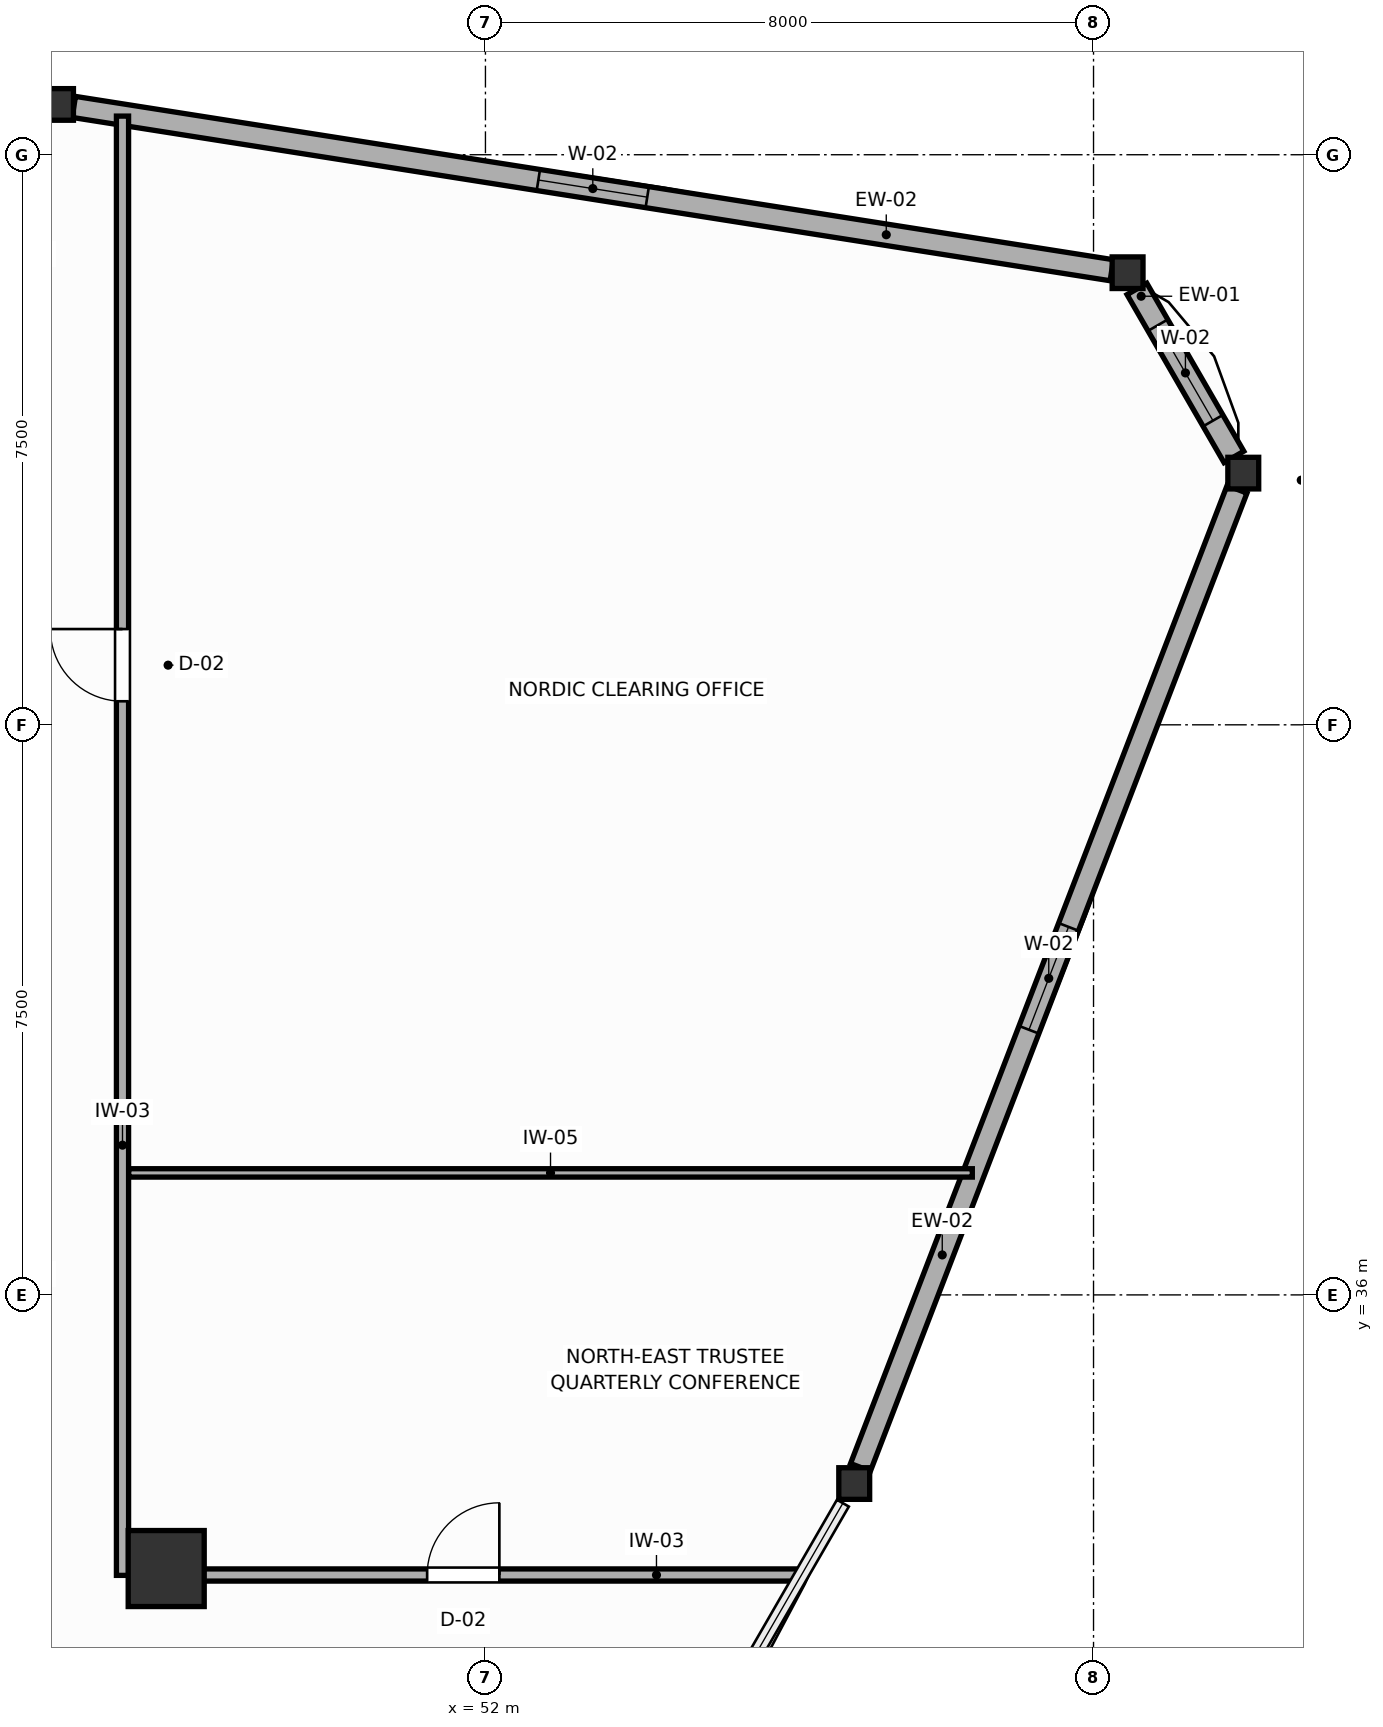
"""IFC4 building model, lengths in metres.
Left out: names, types, materials, properties, quantities, classifications, styles, units other than length and angle.
Written with IfcOpenShell. Run it as: python <this file> out.ifc"""

import sys

from ifc_helpers import new_model, si_unit, direction, frame, frame_2d, origin, origin_2d, place, context, subcontext, project, spatial, rectangle, i_section, extrude, source, transform, mapped, element, fill, save


model = new_model("IFC4")
c1 = context("Model", 3, precision=1e-05, world=origin(), true_north=direction((0.0, 1.0)))
c2 = subcontext(c1, "Body", "Model", "MODEL_VIEW")
j1 = project(units=[si_unit("LENGTHUNIT", "METRE"), si_unit("PLANEANGLEUNIT", "RADIAN")], contexts=[c1])
p1 = place(None, origin())
s1 = spatial("IfcSite", under=j1, at=p1, CompositionType="ELEMENT")
p2 = place(p1, origin())
s2 = spatial("IfcBuilding", under=s1, at=p2, CompositionType="ELEMENT")
p3 = place(p2, frame((0.0, 0.0, 205.8)))
s3 = spatial("IfcBuildingStorey", under=s2, at=p3, CompositionType="ELEMENT", Elevation=205.8)
m1 = source(origin(), c2, "Body", "SweptSolid", [
    extrude(rectangle(XDim=1.0, YDim=1.0, at=origin_2d()), origin(), (0.0, 0.0, 1.0), 3.6),
])
p4 = place(p3, frame((47.8, 32.4, 0.0), z_axis=(0.0, 0.0, 1.0), x_axis=(1.0, 0.0, 0.0)))
e1 = element("IfcColumn", 1, at=p4, inside=s3, PredefinedType="COLUMN", context=c2, shape_type="MappedRepresentation", body=[
    mapped(m1, transform((0.0, 0.0, 0.0), scale=1.0)),
])
m2 = source(origin(), c2, "Body", "SweptSolid", [
    extrude(i_section(OverallWidth=0.406, OverallDepth=0.416, WebThickness=0.027, FlangeThickness=0.044, FilletRadius=0.015, at=origin_2d()), origin(), (0.0, 0.0, 1.0), 3.6),
])
for number, where, z_axis, x_axis in (
    (2, (61.97, 46.811, 0.0), (0.0, 0.0, 1.0), (1.0, 0.0, 0.0)),
    (3, (60.448, 49.448, 0.0), (0.0, 0.0, 1.0), (1.0, 0.0, 0.0)),
    (4, (46.377, 51.662, 0.0), (0.0, 0.0, 1.0), (1.0, 0.0, 0.0)),
    (5, (56.852, 33.518, 0.0), (0.0, 0.0, 1.0), (1.0, 0.0, 0.0)),
):
    element("IfcColumn", number, at=place(p3, frame(where, z_axis=z_axis, x_axis=x_axis)), inside=s3, PredefinedType="COLUMN", context=c2, shape_type="MappedRepresentation", body=[
        mapped(m2, transform((0.0, 0.0, 0.0), scale=1.0)),
    ])
p5 = place(p3, frame((61.847, 47.024, 0.0), z_axis=(0.0, 0.0, 1.0), x_axis=(-0.49997637333, 0.866039044219, 0.0)))
e6 = element("IfcWall", 6, at=p5, inside=s3, PredefinedType="SOLIDWALL", context=c2, shape_type="SweptSolid", body=[
    extrude(rectangle(XDim=2.552, YDim=0.3, at=frame_2d((1.276, 0.0))), origin(), (0.0, 0.0, 1.0), 3.02),
])
p6 = place(p5, frame((0.551, 0.0, 0.75)))
e7 = element("IfcOpeningElement", 7, at=p6, cuts=e6, PredefinedType="OPENING", context=c2, shape_type="SweptSolid", body=[
    extrude(rectangle(XDim=1.45, YDim=1.65, at=frame_2d((0.725, 0.825))), frame((0.0, 0.16, 0.0), z_axis=(0.0, -1.0, 0.0), x_axis=(1.0, 0.0, 0.0)), (0.0, 0.0, 1.0), 0.32),
])
p7 = place(p3, frame((60.24, 49.48, 0.0), z_axis=(0.0, 0.0, 1.0), x_axis=(-0.987848165878, 0.155422009936, 0.0)))
e8 = element("IfcWall", 8, at=p7, inside=s3, PredefinedType="SOLIDWALL", context=c2, shape_type="SweptSolid", body=[
    extrude(rectangle(XDim=13.823, YDim=0.28, at=frame_2d((6.912, 0.0))), origin(), (0.0, 0.0, 1.0), 3.02),
])
p8 = place(p7, frame((6.187, 0.0, 0.75)))
e9 = element("IfcOpeningElement", 9, at=p8, cuts=e8, PredefinedType="OPENING", context=c2, shape_type="SweptSolid", body=[
    extrude(rectangle(XDim=1.45, YDim=1.65, at=frame_2d((0.725, 0.825))), frame((0.0, 0.15, 0.0), z_axis=(0.0, -1.0, 0.0), x_axis=(1.0, 0.0, 0.0)), (0.0, 0.0, 1.0), 0.3),
])
p9 = place(p3, frame((56.934, 33.731, 0.0), z_axis=(0.0, 0.0, 1.0), x_axis=(0.359321962573, 0.933213655715, 0.0)))
e10 = element("IfcWall", 10, at=p9, inside=s3, PredefinedType="SOLIDWALL", context=c2, shape_type="SweptSolid", body=[
    extrude(rectangle(XDim=13.788, YDim=0.28, at=frame_2d((6.894, 0.0))), origin(), (0.0, 0.0, 1.0), 3.02),
])
p10 = place(p9, frame((6.169, 0.0, 0.75)))
e11 = element("IfcOpeningElement", 11, at=p10, cuts=e10, PredefinedType="OPENING", context=c2, shape_type="SweptSolid", body=[
    extrude(rectangle(XDim=1.45, YDim=1.65, at=frame_2d((0.725, 0.825))), frame((0.0, 0.15, 0.0), z_axis=(0.0, -1.0, 0.0), x_axis=(1.0, 0.0, 0.0)), (0.0, 0.0, 1.0), 0.3),
])
p11 = place(p3, frame((47.225, 32.31, 0.0), z_axis=(0.0, 0.0, 1.0), x_axis=(0.0, 1.0, 0.0)))
e12 = element("IfcWall", 12, at=p11, inside=s3, PredefinedType="PARTITIONING", context=c2, shape_type="SweptSolid", body=[
    extrude(rectangle(XDim=19.198, YDim=0.16, at=frame_2d((9.599, 0.0))), origin(), (0.0, 0.0, 1.0), 3.41),
])
p12 = place(p11, frame((11.5, 0.0, 0.0)))
e13 = element("IfcOpeningElement", 13, at=p12, cuts=e12, PredefinedType="OPENING", context=c2, shape_type="SweptSolid", body=[
    extrude(rectangle(XDim=0.95, YDim=2.05, at=frame_2d((0.475, 1.025))), frame((0.0, 0.09, 0.0), z_axis=(0.0, -1.0, 0.0), x_axis=(1.0, 0.0, 0.0)), (0.0, 0.0, 1.0), 0.18),
])
p13 = place(p3, frame((47.307, 32.315, 0.0), z_axis=(0.0, 0.0, 1.0), x_axis=(1.0, 0.0, 0.0)))
e14 = element("IfcWall", 14, at=p13, inside=s3, PredefinedType="PARTITIONING", context=c2, shape_type="SweptSolid", body=[
    extrude(rectangle(XDim=8.83, YDim=0.16, at=frame_2d((4.415, 0.0))), origin(), (0.0, 0.0, 1.0), 2.96),
])
p14 = place(p13, frame((3.926, 0.0, 0.0)))
e15 = element("IfcOpeningElement", 15, at=p14, cuts=e14, PredefinedType="OPENING", context=c2, shape_type="SweptSolid", body=[
    extrude(rectangle(XDim=0.95, YDim=2.05, at=frame_2d((0.475, 1.025))), frame((0.0, 0.09, 0.0), z_axis=(0.0, -1.0, 0.0), x_axis=(1.0, 0.0, 0.0)), (0.0, 0.0, 1.0), 0.18),
])
p15 = place(p3, frame((47.307, 37.605, 0.0), z_axis=(0.0, 0.0, 1.0), x_axis=(1.0, 0.0, 0.0)))
e16 = element("IfcWall", 16, at=p15, inside=s3, PredefinedType="MOVABLE", context=c2, shape_type="SweptSolid", body=[
    extrude(rectangle(XDim=11.098, YDim=0.11, at=frame_2d((5.549, 0.0))), origin(), (0.0, 0.0, 1.0), 3.41),
])
p16 = place(p6, origin())
e17 = element("IfcWindow", 17, at=p16, inside=s3, PartitioningType="SINGLE_PANEL", PredefinedType="WINDOW", context=c2, shape_type="SweptSolid", body=[
    extrude(rectangle(XDim=1.45, YDim=1.65, at=frame_2d((0.725, 0.825))), frame((0.0, 0.03, 0.0), z_axis=(0.0, -1.0, 0.0), x_axis=(1.0, 0.0, 0.0)), (0.0, 0.0, 1.0), 0.06),
])
fill(e7, e17)
p17 = place(p8, origin())
e18 = element("IfcWindow", 18, at=p17, inside=s3, PartitioningType="SINGLE_PANEL", PredefinedType="WINDOW", context=c2, shape_type="SweptSolid", body=[
    extrude(rectangle(XDim=1.45, YDim=1.65, at=frame_2d((0.725, 0.825))), frame((0.0, 0.03, 0.0), z_axis=(0.0, -1.0, 0.0), x_axis=(1.0, 0.0, 0.0)), (0.0, 0.0, 1.0), 0.06),
])
fill(e9, e18)
p18 = place(p10, origin())
e19 = element("IfcWindow", 19, at=p18, inside=s3, PartitioningType="SINGLE_PANEL", PredefinedType="WINDOW", context=c2, shape_type="SweptSolid", body=[
    extrude(rectangle(XDim=1.45, YDim=1.65, at=frame_2d((0.725, 0.825))), frame((0.0, 0.03, 0.0), z_axis=(0.0, -1.0, 0.0), x_axis=(1.0, 0.0, 0.0)), (0.0, 0.0, 1.0), 0.06),
])
fill(e11, e19)
p19 = place(p12, origin())
e20 = element("IfcDoor", 20, at=p19, inside=s3, OperationType="SINGLE_SWING_RIGHT", PredefinedType="DOOR", context=c2, shape_type="SweptSolid", body=[
    extrude(rectangle(XDim=0.95, YDim=2.05, at=frame_2d((0.475, 1.025))), frame((0.0, 0.025, 0.0), z_axis=(0.0, -1.0, 0.0), x_axis=(1.0, 0.0, 0.0)), (0.0, 0.0, 1.0), 0.05),
])
fill(e13, e20)
p20 = place(p14, origin())
e21 = element("IfcDoor", 21, at=p20, inside=s3, OperationType="SINGLE_SWING_RIGHT", PredefinedType="DOOR", context=c2, shape_type="SweptSolid", body=[
    extrude(rectangle(XDim=0.95, YDim=2.05, at=frame_2d((0.475, 1.025))), frame((0.0, 0.025, 0.0), z_axis=(0.0, -1.0, 0.0), x_axis=(1.0, 0.0, 0.0)), (0.0, 0.0, 1.0), 0.05),
])
fill(e15, e21)
save(model, sys.argv[1])
